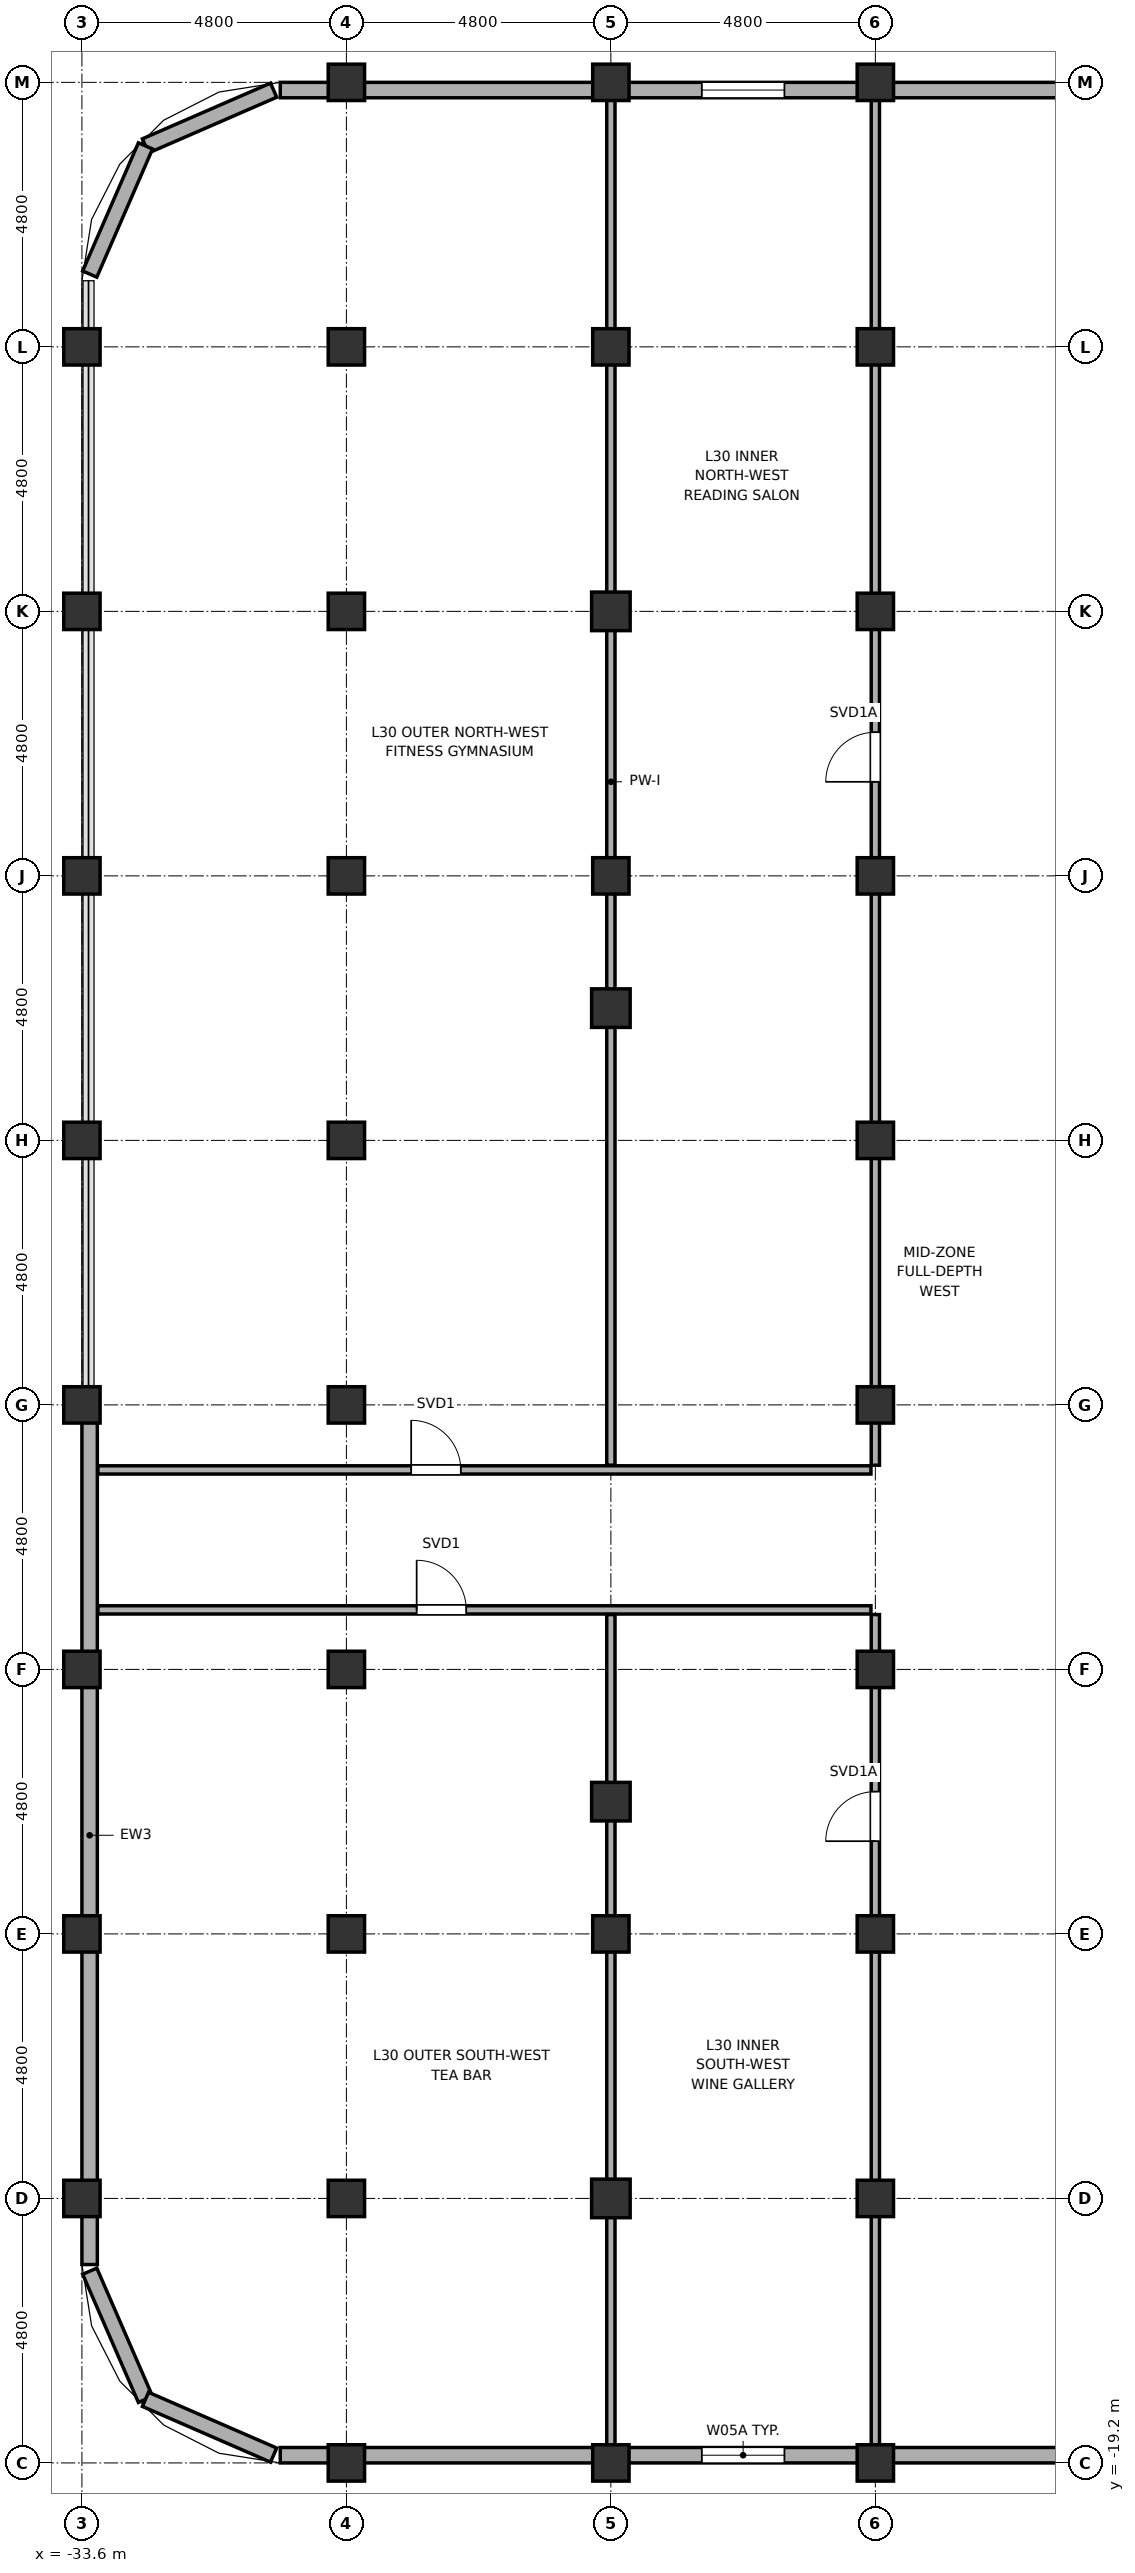
"""IFC4 building model, lengths in metres.
Left out: names, types, materials, properties, quantities, classifications, styles, units other than length and angle.
Written with IfcOpenShell. Run it as: python <this file> out.ifc"""

import sys

from ifc_helpers import new_model, si_unit, direction, frame, frame_2d, origin, origin_2d, place, context, subcontext, project, spatial, rectangle, hollow_rectangle, hollow_circle, extrude, element, fill, save


model = new_model("IFC4")
c1 = context("Model", 3, precision=1e-05, world=origin(), true_north=direction((0.0, 1.0)))
c2 = subcontext(c1, "Body", "Model", "MODEL_VIEW")
j1 = project(units=[si_unit("LENGTHUNIT", "METRE"), si_unit("PLANEANGLEUNIT", "RADIAN")], contexts=[c1])
p1 = place(None, origin())
s1 = spatial("IfcSite", under=j1, at=p1, CompositionType="ELEMENT")
p2 = place(p1, origin())
s2 = spatial("IfcBuilding", under=s1, at=p2, CompositionType="ELEMENT")
p3 = place(p2, frame((0.0, 0.0, 124.8)))
s3 = spatial("IfcBuildingStorey", under=s2, at=p3, CompositionType="ELEMENT", Elevation=124.8)
for number, where, z_axis, x_axis in (
    (1, (-33.6, -14.4, -0.18), (0.0, 0.0, 1.0), (1.0, 0.0, 0.0)),
    (2, (-33.6, -9.6, -0.18), (0.0, 0.0, 1.0), (1.0, 0.0, 0.0)),
    (3, (-33.6, -4.8, -0.18), (0.0, 0.0, 1.0), (1.0, 0.0, 0.0)),
    (4, (-33.6, 0.0, -0.18), (0.0, 0.0, 1.0), (1.0, 0.0, 0.0)),
    (5, (-33.6, 4.8, -0.18), (0.0, 0.0, 1.0), (1.0, 0.0, 0.0)),
    (6, (-33.6, 9.6, -0.18), (0.0, 0.0, 1.0), (1.0, 0.0, 0.0)),
    (7, (-33.6, 14.4, -0.18), (0.0, 0.0, 1.0), (1.0, 0.0, 0.0)),
    (8, (-33.6, 19.2, -0.18), (0.0, 0.0, 1.0), (1.0, 0.0, 0.0)),
):
    element("IfcColumn", number, at=place(p3, frame(where, z_axis=z_axis, x_axis=x_axis)), inside=s3, PredefinedType="COLUMN", context=c2, shape_type="SweptSolid", body=[
        extrude(hollow_circle(Radius=0.33, WallThickness=0.028, at=origin_2d()), origin(), (0.0, 0.0, 1.0), 3.88),
    ])
for number, where, z_axis, x_axis in (
    (9, (-28.8, -19.2, 0.0), (0.0, 0.0, 1.0), (1.0, 0.0, 0.0)),
    (10, (-28.8, -14.4, 0.0), (0.0, 0.0, 1.0), (1.0, 0.0, 0.0)),
    (11, (-28.8, -9.6, 0.0), (0.0, 0.0, 1.0), (1.0, 0.0, 0.0)),
    (12, (-28.8, -4.8, 0.0), (0.0, 0.0, 1.0), (1.0, 0.0, 0.0)),
    (13, (-28.8, 0.0, 0.0), (0.0, 0.0, 1.0), (1.0, 0.0, 0.0)),
    (14, (-28.8, 4.8, 0.0), (0.0, 0.0, 1.0), (1.0, 0.0, 0.0)),
    (15, (-28.8, 9.6, 0.0), (0.0, 0.0, 1.0), (1.0, 0.0, 0.0)),
    (16, (-28.8, 14.4, 0.0), (0.0, 0.0, 1.0), (1.0, 0.0, 0.0)),
    (17, (-28.8, 19.2, 0.0), (0.0, 0.0, 1.0), (1.0, 0.0, 0.0)),
):
    element("IfcColumn", number, at=place(p3, frame(where, z_axis=z_axis, x_axis=x_axis)), inside=s3, PredefinedType="COLUMN", context=c2, shape_type="SweptSolid", body=[
        extrude(hollow_circle(Radius=0.33, WallThickness=0.028, at=origin_2d()), origin(), (0.0, 0.0, 1.0), 3.7),
    ])
p4 = place(p3, frame((-28.8, 24.0, -0.18), z_axis=(0.0, 0.0, 1.0), x_axis=(1.0, 0.0, 0.0)))
e18 = element("IfcColumn", 18, at=p4, inside=s3, PredefinedType="COLUMN", context=c2, shape_type="SweptSolid", body=[
    extrude(hollow_circle(Radius=0.33, WallThickness=0.028, at=origin_2d()), origin(), (0.0, 0.0, 1.0), 3.88),
])
p5 = place(p3, frame((-24.0, -19.2, 0.0), z_axis=(0.0, 0.0, 1.0), x_axis=(1.0, 0.0, 0.0)))
e19 = element("IfcColumn", 19, at=p5, inside=s3, PredefinedType="COLUMN", context=c2, shape_type="SweptSolid", body=[
    extrude(hollow_circle(Radius=0.33, WallThickness=0.028, at=origin_2d()), origin(), (0.0, 0.0, 1.0), 3.7),
])
p6 = place(p3, frame((-24.0, -14.4, 0.0), z_axis=(0.0, 0.0, 1.0), x_axis=(1.0, 0.0, 0.0)))
e20 = element("IfcColumn", 20, at=p6, inside=s3, PredefinedType="COLUMN", context=c2, shape_type="SweptSolid", body=[
    extrude(hollow_rectangle(XDim=0.7, YDim=0.7, WallThickness=0.032, at=origin_2d()), origin(), (0.0, 0.0, 1.0), 3.7),
])
p7 = place(p3, frame((-24.0, -9.6, 0.0), z_axis=(0.0, 0.0, 1.0), x_axis=(1.0, 0.0, 0.0)))
e21 = element("IfcColumn", 21, at=p7, inside=s3, PredefinedType="COLUMN", context=c2, shape_type="SweptSolid", body=[
    extrude(hollow_circle(Radius=0.33, WallThickness=0.028, at=origin_2d()), origin(), (0.0, 0.0, 1.0), 3.7),
])
for number, where, z_axis, x_axis in (
    (22, (-24.0, -7.2, 0.0), (0.0, 0.0, 1.0), (1.0, 0.0, 0.0)),
    (23, (-24.0, 7.2, 0.0), (0.0, 0.0, 1.0), (1.0, 0.0, 0.0)),
):
    element("IfcColumn", number, at=place(p3, frame(where, z_axis=z_axis, x_axis=x_axis)), inside=s3, PredefinedType="COLUMN", context=c2, shape_type="SweptSolid", body=[
        extrude(hollow_rectangle(XDim=0.7, YDim=0.7, WallThickness=0.032, at=origin_2d()), origin(), (0.0, 0.0, 1.0), 3.7),
    ])
p8 = place(p3, frame((-24.0, 9.6, 0.0), z_axis=(0.0, 0.0, 1.0), x_axis=(1.0, 0.0, 0.0)))
e24 = element("IfcColumn", 24, at=p8, inside=s3, PredefinedType="COLUMN", context=c2, shape_type="SweptSolid", body=[
    extrude(hollow_circle(Radius=0.33, WallThickness=0.028, at=origin_2d()), origin(), (0.0, 0.0, 1.0), 3.7),
])
p9 = place(p3, frame((-24.0, 14.4, 0.0), z_axis=(0.0, 0.0, 1.0), x_axis=(1.0, 0.0, 0.0)))
e25 = element("IfcColumn", 25, at=p9, inside=s3, PredefinedType="COLUMN", context=c2, shape_type="SweptSolid", body=[
    extrude(hollow_rectangle(XDim=0.7, YDim=0.7, WallThickness=0.032, at=origin_2d()), origin(), (0.0, 0.0, 1.0), 3.7),
])
for number, where, z_axis, x_axis in (
    (26, (-24.0, 19.2, 0.0), (0.0, 0.0, 1.0), (1.0, 0.0, 0.0)),
    (27, (-24.0, 24.0, 0.0), (0.0, 0.0, 1.0), (1.0, 0.0, 0.0)),
    (28, (-19.2, -19.2, 0.0), (0.0, 0.0, 1.0), (1.0, 0.0, 0.0)),
    (29, (-19.2, -14.4, 0.0), (0.0, 0.0, 1.0), (1.0, 0.0, 0.0)),
    (30, (-19.2, -9.6, 0.0), (0.0, 0.0, 1.0), (1.0, 0.0, 0.0)),
    (31, (-19.2, -4.8, 0.0), (0.0, 0.0, 1.0), (1.0, 0.0, 0.0)),
    (32, (-19.2, 0.0, 0.0), (0.0, 0.0, 1.0), (1.0, 0.0, 0.0)),
    (33, (-19.2, 4.8, 0.0), (0.0, 0.0, 1.0), (1.0, 0.0, 0.0)),
    (34, (-19.2, 9.6, 0.0), (0.0, 0.0, 1.0), (1.0, 0.0, 0.0)),
    (35, (-19.2, 14.4, 0.0), (0.0, 0.0, 1.0), (1.0, 0.0, 0.0)),
    (36, (-19.2, 19.2, 0.0), (0.0, 0.0, 1.0), (1.0, 0.0, 0.0)),
    (37, (-19.2, 24.0, 0.0), (0.0, 0.0, 1.0), (1.0, 0.0, 0.0)),
):
    element("IfcColumn", number, at=place(p3, frame(where, z_axis=z_axis, x_axis=x_axis)), inside=s3, PredefinedType="COLUMN", context=c2, shape_type="SweptSolid", body=[
        extrude(hollow_circle(Radius=0.33, WallThickness=0.028, at=origin_2d()), origin(), (0.0, 0.0, 1.0), 3.7),
    ])
p10 = place(p3, frame((-33.458, -15.721, 0.0), z_axis=(0.0, 0.0, 1.0), x_axis=(0.398792985289, -0.917040977756, 0.0)))
e38 = element("IfcWall", 38, at=p10, inside=s3, PredefinedType="SOLIDWALL", context=c2, shape_type="SweptSolid", body=[
    extrude(rectangle(XDim=2.536, YDim=0.28, at=frame_2d((1.268, 0.0))), origin(), (0.0, 0.0, 1.0), 2.12),
])
for number, where, z_axis, x_axis in (
    (39, (-32.447, -18.047, 0.0), (0.0, 0.0, 1.0), (0.917, -0.399, 0.0)),
    (40, (-30.121, 23.858, 0.0), (0.0, 0.0, 1.0), (-0.917, -0.399, 0.0)),
):
    element("IfcWall", number, at=place(p3, frame(where, z_axis=z_axis, x_axis=x_axis)), inside=s3, PredefinedType="SOLIDWALL", context=c2, shape_type="SweptSolid", body=[
        extrude(rectangle(XDim=2.536, YDim=0.28, at=frame_2d((1.268, 0.0))), origin(), (0.0, 0.0, 1.0), 2.12),
    ])
p11 = place(p3, frame((-32.447, 22.847, 0.0), z_axis=(0.0, 0.0, 1.0), x_axis=(-0.398792985289, -0.917040977756, 0.0)))
e41 = element("IfcWall", 41, at=p11, inside=s3, PredefinedType="SOLIDWALL", context=c2, shape_type="SweptSolid", body=[
    extrude(rectangle(XDim=2.536, YDim=0.28, at=frame_2d((1.268, 0.0))), origin(), (0.0, 0.0, 1.0), 2.12),
])
p12 = place(p3, frame((-30.0, -19.06, 0.0), z_axis=(0.0, 0.0, 1.0), x_axis=(1.0, 0.0, 0.0)))
e42 = element("IfcWall", 42, at=p12, inside=s3, PredefinedType="SOLIDWALL", context=c2, shape_type="SweptSolid", body=[
    extrude(rectangle(XDim=25.25, YDim=0.28, at=frame_2d((12.625, 0.0))), origin(), (0.0, 0.0, 1.0), 2.12),
])
p13 = place(p12, frame((7.65, 0.0, 0.75)))
e43 = element("IfcOpeningElement", 43, at=p13, cuts=e42, PredefinedType="OPENING", context=c2, shape_type="SweptSolid", body=[
    extrude(rectangle(XDim=1.5, YDim=1.15, at=frame_2d((0.75, 0.575))), frame((0.0, 0.155, 0.0), z_axis=(0.0, -1.0, 0.0), x_axis=(1.0, 0.0, 0.0)), (0.0, 0.0, 1.0), 0.31),
])
p14 = place(p12, frame((17.25, 0.0, 0.75)))
e44 = element("IfcOpeningElement", 44, at=p14, cuts=e42, PredefinedType="OPENING", context=c2, shape_type="SweptSolid", body=[
    extrude(rectangle(XDim=1.5, YDim=1.15, at=frame_2d((0.75, 0.575))), frame((0.0, 0.155, 0.0), z_axis=(0.0, -1.0, 0.0), x_axis=(1.0, 0.0, 0.0)), (0.0, 0.0, 1.0), 0.31),
])
p15 = place(p12, frame((22.05, 0.0, 0.75)))
e45 = element("IfcOpeningElement", 45, at=p15, cuts=e42, PredefinedType="OPENING", context=c2, shape_type="SweptSolid", body=[
    extrude(rectangle(XDim=1.5, YDim=1.15, at=frame_2d((0.75, 0.575))), frame((0.0, 0.155, 0.0), z_axis=(0.0, -1.0, 0.0), x_axis=(1.0, 0.0, 0.0)), (0.0, 0.0, 1.0), 0.31),
])
p16 = place(p3, frame((-30.0, 23.86, 0.0), z_axis=(0.0, 0.0, 1.0), x_axis=(1.0, 0.0, 0.0)))
e46 = element("IfcWall", 46, at=p16, inside=s3, PredefinedType="SOLIDWALL", context=c2, shape_type="SweptSolid", body=[
    extrude(rectangle(XDim=25.25, YDim=0.28, at=frame_2d((12.625, 0.0))), origin(), (0.0, 0.0, 1.0), 2.12),
])
p17 = place(p16, frame((7.65, 0.0, 0.75)))
e47 = element("IfcOpeningElement", 47, at=p17, cuts=e46, PredefinedType="OPENING", context=c2, shape_type="SweptSolid", body=[
    extrude(rectangle(XDim=1.5, YDim=1.15, at=frame_2d((0.75, 0.575))), frame((0.0, 0.155, 0.0), z_axis=(0.0, -1.0, 0.0), x_axis=(1.0, 0.0, 0.0)), (0.0, 0.0, 1.0), 0.31),
])
p18 = place(p16, frame((18.6, 0.0, 0.75)))
e48 = element("IfcOpeningElement", 48, at=p18, cuts=e46, PredefinedType="OPENING", context=c2, shape_type="SweptSolid", body=[
    extrude(rectangle(XDim=1.2, YDim=1.15, at=frame_2d((0.6, 0.575))), frame((0.0, 0.155, 0.0), z_axis=(0.0, -1.0, 0.0), x_axis=(1.0, 0.0, 0.0)), (0.0, 0.0, 1.0), 0.31),
])
p19 = place(p16, frame((22.05, 0.0, 0.75)))
e49 = element("IfcOpeningElement", 49, at=p19, cuts=e46, PredefinedType="OPENING", context=c2, shape_type="SweptSolid", body=[
    extrude(rectangle(XDim=1.5, YDim=1.15, at=frame_2d((0.75, 0.575))), frame((0.0, 0.155, 0.0), z_axis=(0.0, -1.0, 0.0), x_axis=(1.0, 0.0, 0.0)), (0.0, 0.0, 1.0), 0.31),
])
p20 = place(p3, frame((-33.46, -15.6, 0.0), z_axis=(0.0, 0.0, 1.0), x_axis=(0.0, 1.0, 0.0)))
e50 = element("IfcWall", 50, at=p20, inside=s3, PredefinedType="SOLIDWALL", context=c2, shape_type="SweptSolid", body=[
    extrude(rectangle(XDim=15.58, YDim=0.28, at=frame_2d((7.79, 0.0))), origin(), (0.0, 0.0, 1.0), 2.12),
])
p21 = place(p3, frame((-33.31, -3.72, 0.0), z_axis=(0.0, 0.0, 1.0), x_axis=(1.0, 0.0, 0.0)))
e51 = element("IfcWall", 51, at=p21, inside=s3, PredefinedType="PARTITIONING", context=c2, shape_type="SweptSolid", body=[
    extrude(rectangle(XDim=14.03, YDim=0.15, at=frame_2d((7.015, 0.0))), origin(), (0.0, 0.0, 1.0), 2.87),
])
p22 = place(p21, frame((5.785, 0.0, 0.0)))
e52 = element("IfcOpeningElement", 52, at=p22, cuts=e51, PredefinedType="OPENING", context=c2, shape_type="SweptSolid", body=[
    extrude(rectangle(XDim=0.9, YDim=2.1, at=frame_2d((0.45, 1.05))), frame((0.0, 0.09, 0.0), z_axis=(0.0, -1.0, 0.0), x_axis=(1.0, 0.0, 0.0)), (0.0, 0.0, 1.0), 0.18),
])
p23 = place(p3, frame((-33.31, -1.18, 0.0), z_axis=(0.0, 0.0, 1.0), x_axis=(1.0, 0.0, 0.0)))
e53 = element("IfcWall", 53, at=p23, inside=s3, PredefinedType="PARTITIONING", context=c2, shape_type="SweptSolid", body=[
    extrude(rectangle(XDim=14.03, YDim=0.15, at=frame_2d((7.015, 0.0))), origin(), (0.0, 0.0, 1.0), 2.87),
])
p24 = place(p23, frame((5.686, 0.0, 0.0)))
e54 = element("IfcOpeningElement", 54, at=p24, cuts=e53, PredefinedType="OPENING", context=c2, shape_type="SweptSolid", body=[
    extrude(rectangle(XDim=0.9, YDim=2.1, at=frame_2d((0.45, 1.05))), frame((0.0, 0.09, 0.0), z_axis=(0.0, -1.0, 0.0), x_axis=(1.0, 0.0, 0.0)), (0.0, 0.0, 1.0), 0.18),
])
p25 = place(p3, frame((-24.0, -18.91, 0.0), z_axis=(0.0, 0.0, 1.0), x_axis=(0.0, 1.0, 0.0)))
e55 = element("IfcWall", 55, at=p25, inside=s3, PredefinedType="PARTITIONING", context=c2, shape_type="SweptSolid", body=[
    extrude(rectangle(XDim=15.105, YDim=0.15, at=frame_2d((7.552, 0.0))), origin(), (0.0, 0.0, 1.0), 2.12),
])
p26 = place(p3, frame((-24.0, -1.095, 0.0), z_axis=(0.0, 0.0, 1.0), x_axis=(0.0, 1.0, 0.0)))
e56 = element("IfcWall", 56, at=p26, inside=s3, PredefinedType="PARTITIONING", context=c2, shape_type="SweptSolid", body=[
    extrude(rectangle(XDim=24.805, YDim=0.15, at=frame_2d((12.402, 0.0))), origin(), (0.0, 0.0, 1.0), 2.12),
])
p27 = place(p3, frame((-19.2, -18.91, 0.0), z_axis=(0.0, 0.0, 1.0), x_axis=(0.0, 1.0, 0.0)))
e57 = element("IfcWall", 57, at=p27, inside=s3, PredefinedType="PARTITIONING", context=c2, shape_type="SweptSolid", body=[
    extrude(rectangle(XDim=15.105, YDim=0.15, at=frame_2d((7.552, 0.0))), origin(), (0.0, 0.0, 1.0), 2.12),
])
p28 = place(p27, frame((10.993, 0.0, 0.0)))
e58 = element("IfcOpeningElement", 58, at=p28, cuts=e57, PredefinedType="OPENING", context=c2, shape_type="SweptSolid", body=[
    extrude(rectangle(XDim=0.9, YDim=2.02, at=frame_2d((0.45, 1.01))), frame((0.0, 0.09, 0.0), z_axis=(0.0, -1.0, 0.0), x_axis=(1.0, 0.0, 0.0)), (0.0, 0.0, 1.0), 0.18),
])
p29 = place(p3, frame((-19.2, -1.095, 0.0), z_axis=(0.0, 0.0, 1.0), x_axis=(0.0, 1.0, 0.0)))
e59 = element("IfcWall", 59, at=p29, inside=s3, PredefinedType="PARTITIONING", context=c2, shape_type="SweptSolid", body=[
    extrude(rectangle(XDim=24.805, YDim=0.15, at=frame_2d((12.402, 0.0))), origin(), (0.0, 0.0, 1.0), 2.12),
])
p30 = place(p29, frame((12.402, 0.0, 0.0)))
e60 = element("IfcOpeningElement", 60, at=p30, cuts=e59, PredefinedType="OPENING", context=c2, shape_type="SweptSolid", body=[
    extrude(rectangle(XDim=0.9, YDim=2.02, at=frame_2d((0.45, 1.01))), frame((0.0, 0.09, 0.0), z_axis=(0.0, -1.0, 0.0), x_axis=(1.0, 0.0, 0.0)), (0.0, 0.0, 1.0), 0.18),
])
p31 = place(p13, origin())
e61 = element("IfcWindow", 61, at=p31, inside=s3, PartitioningType="SINGLE_PANEL", PredefinedType="WINDOW", context=c2, shape_type="SweptSolid", body=[
    extrude(rectangle(XDim=1.5, YDim=1.15, at=frame_2d((0.75, 0.575))), frame((0.0, 0.03, 0.0), z_axis=(0.0, -1.0, 0.0), x_axis=(1.0, 0.0, 0.0)), (0.0, 0.0, 1.0), 0.06),
])
fill(e43, e61)
p32 = place(p17, origin())
e62 = element("IfcWindow", 62, at=p32, inside=s3, PartitioningType="SINGLE_PANEL", PredefinedType="WINDOW", context=c2, shape_type="SweptSolid", body=[
    extrude(rectangle(XDim=1.5, YDim=1.15, at=frame_2d((0.75, 0.575))), frame((0.0, 0.03, 0.0), z_axis=(0.0, -1.0, 0.0), x_axis=(1.0, 0.0, 0.0)), (0.0, 0.0, 1.0), 0.06),
])
fill(e47, e62)
p33 = place(p22, origin())
e63 = element("IfcDoor", 63, at=p33, inside=s3, OperationType="SINGLE_SWING_RIGHT", PredefinedType="DOOR", context=c2, shape_type="SweptSolid", body=[
    extrude(rectangle(XDim=0.9, YDim=2.1, at=frame_2d((0.45, 1.05))), frame((0.0, 0.025, 0.0), z_axis=(0.0, -1.0, 0.0), x_axis=(1.0, 0.0, 0.0)), (0.0, 0.0, 1.0), 0.05),
])
fill(e52, e63)
p34 = place(p28, origin())
e64 = element("IfcDoor", 64, at=p34, inside=s3, OperationType="SINGLE_SWING_LEFT", PredefinedType="DOOR", context=c2, shape_type="SweptSolid", body=[
    extrude(rectangle(XDim=0.9, YDim=2.02, at=frame_2d((0.45, 1.01))), frame((0.0, 0.025, 0.0), z_axis=(0.0, -1.0, 0.0), x_axis=(1.0, 0.0, 0.0)), (0.0, 0.0, 1.0), 0.05),
])
fill(e58, e64)
p35 = place(p24, origin())
e65 = element("IfcDoor", 65, at=p35, inside=s3, OperationType="SINGLE_SWING_LEFT", PredefinedType="DOOR", context=c2, shape_type="SweptSolid", body=[
    extrude(rectangle(XDim=0.9, YDim=2.1, at=frame_2d((0.45, 1.05))), frame((0.0, 0.025, 0.0), z_axis=(0.0, -1.0, 0.0), x_axis=(1.0, 0.0, 0.0)), (0.0, 0.0, 1.0), 0.05),
])
fill(e54, e65)
p36 = place(p30, origin())
e66 = element("IfcDoor", 66, at=p36, inside=s3, OperationType="SINGLE_SWING_LEFT", PredefinedType="DOOR", context=c2, shape_type="SweptSolid", body=[
    extrude(rectangle(XDim=0.9, YDim=2.02, at=frame_2d((0.45, 1.01))), frame((0.0, 0.025, 0.0), z_axis=(0.0, -1.0, 0.0), x_axis=(1.0, 0.0, 0.0)), (0.0, 0.0, 1.0), 0.05),
])
fill(e60, e66)
save(model, sys.argv[1])
